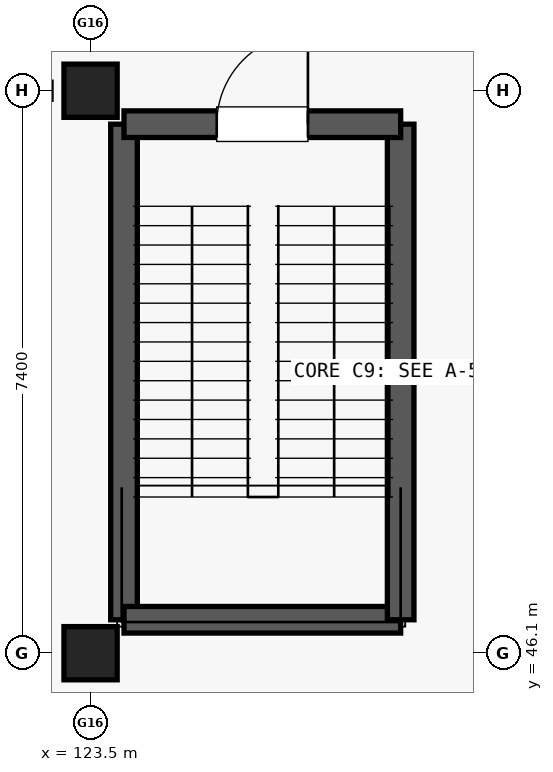
"""IFC4 building model, lengths in metres.
Left out: names, types, materials, properties, quantities, classifications, styles, units other than length and angle.
Written with IfcOpenShell. Run it as: python <this file> out.ifc"""

import sys

from ifc_helpers import new_model, si_unit, direction, frame, frame_2d, origin, origin_2d, place, context, subcontext, project, spatial, rectangle, extrude, element, fill, save


model = new_model("IFC4")
c1 = context("Model", 3, precision=1e-05, world=origin(), true_north=direction((0.0, 1.0)))
c2 = subcontext(c1, "Body", "Model", "MODEL_VIEW")
j1 = project(units=[si_unit("LENGTHUNIT", "METRE"), si_unit("PLANEANGLEUNIT", "RADIAN")], contexts=[c1])
p1 = place(None, origin())
s1 = spatial("IfcSite", under=j1, at=p1, CompositionType="ELEMENT")
p2 = place(p1, origin())
s2 = spatial("IfcBuilding", under=s1, at=p2, CompositionType="ELEMENT")
p3 = place(p2, origin())
s3 = spatial("IfcBuildingStorey", under=s2, at=p3, CompositionType="ELEMENT", Elevation=0.0)
for number, where, z_axis, x_axis in (
    (1, (123.5, 46.1, 0.0), (0.0, 0.0, 1.0), (1.0, 0.0, 0.0)),
    (2, (123.5, 53.5, 0.0), (0.0, 0.0, 1.0), (1.0, 0.0, 0.0)),
):
    element("IfcColumn", number, at=place(p3, frame(where, z_axis=z_axis, x_axis=x_axis)), inside=s3, PredefinedType="COLUMN", context=c2, shape_type="SweptSolid", body=[
        extrude(rectangle(XDim=0.7, YDim=0.7, at=origin_2d()), origin(), (0.0, 0.0, 1.0), 5.135),
    ])
p4 = place(p3, frame((123.94, 46.54, 0.0), z_axis=(0.0, 0.0, 1.0), x_axis=(0.0, 1.0, 0.0)))
e3 = element("IfcWall", 3, at=p4, inside=s3, PredefinedType="SHEAR", context=c2, shape_type="SweptSolid", body=[
    extrude(rectangle(XDim=6.52, YDim=0.35, at=frame_2d((3.26, 0.0))), origin(), (0.0, 0.0, 1.0), 5.13),
])
p5 = place(p3, frame((123.94, 46.54, 0.0), z_axis=(0.0, 0.0, 1.0), x_axis=(1.0, 0.0, 0.0)))
e4 = element("IfcWall", 4, at=p5, inside=s3, PredefinedType="SHEAR", context=c2, shape_type="SweptSolid", body=[
    extrude(rectangle(XDim=3.64, YDim=0.35, at=frame_2d((1.82, 0.0))), origin(), (0.0, 0.0, 1.0), 5.13),
])
p6 = place(p3, frame((127.58, 46.54, 0.0), z_axis=(0.0, 0.0, 1.0), x_axis=(0.0, 1.0, 0.0)))
e5 = element("IfcWall", 5, at=p6, inside=s3, PredefinedType="SHEAR", context=c2, shape_type="SweptSolid", body=[
    extrude(rectangle(XDim=6.52, YDim=0.35, at=frame_2d((3.26, 0.0))), origin(), (0.0, 0.0, 1.0), 5.13),
])
p7 = place(p3, frame((123.94, 53.06, 0.0), z_axis=(0.0, 0.0, 1.0), x_axis=(1.0, 0.0, 0.0)))
e6 = element("IfcWall", 6, at=p7, inside=s3, PredefinedType="SHEAR", context=c2, shape_type="SweptSolid", body=[
    extrude(rectangle(XDim=3.64, YDim=0.35, at=frame_2d((1.82, 0.0))), origin(), (0.0, 0.0, 1.0), 5.13),
])
p8 = place(p7, frame((1.22, 0.0, 0.0)))
e7 = element("IfcOpeningElement", 7, at=p8, cuts=e6, PredefinedType="OPENING", context=c2, shape_type="SweptSolid", body=[
    extrude(rectangle(XDim=1.2, YDim=2.15, at=frame_2d((0.6, 1.075))), frame((0.0, 0.185, 0.0), z_axis=(0.0, -1.0, 0.0), x_axis=(1.0, 0.0, 0.0)), (0.0, 0.0, 1.0), 0.37),
])
p9 = place(p8, origin())
e8 = element("IfcDoor", 8, at=p9, inside=s3, OperationType="SINGLE_SWING_RIGHT", PredefinedType="DOOR", context=c2, shape_type="SweptSolid", body=[
    extrude(rectangle(XDim=1.2, YDim=2.15, at=frame_2d((0.6, 1.075))), frame((0.0, 0.025, 0.0), z_axis=(0.0, -1.0, 0.0), x_axis=(1.0, 0.0, 0.0)), (0.0, 0.0, 1.0), 0.05),
])
fill(e7, e8)
save(model, sys.argv[1])
